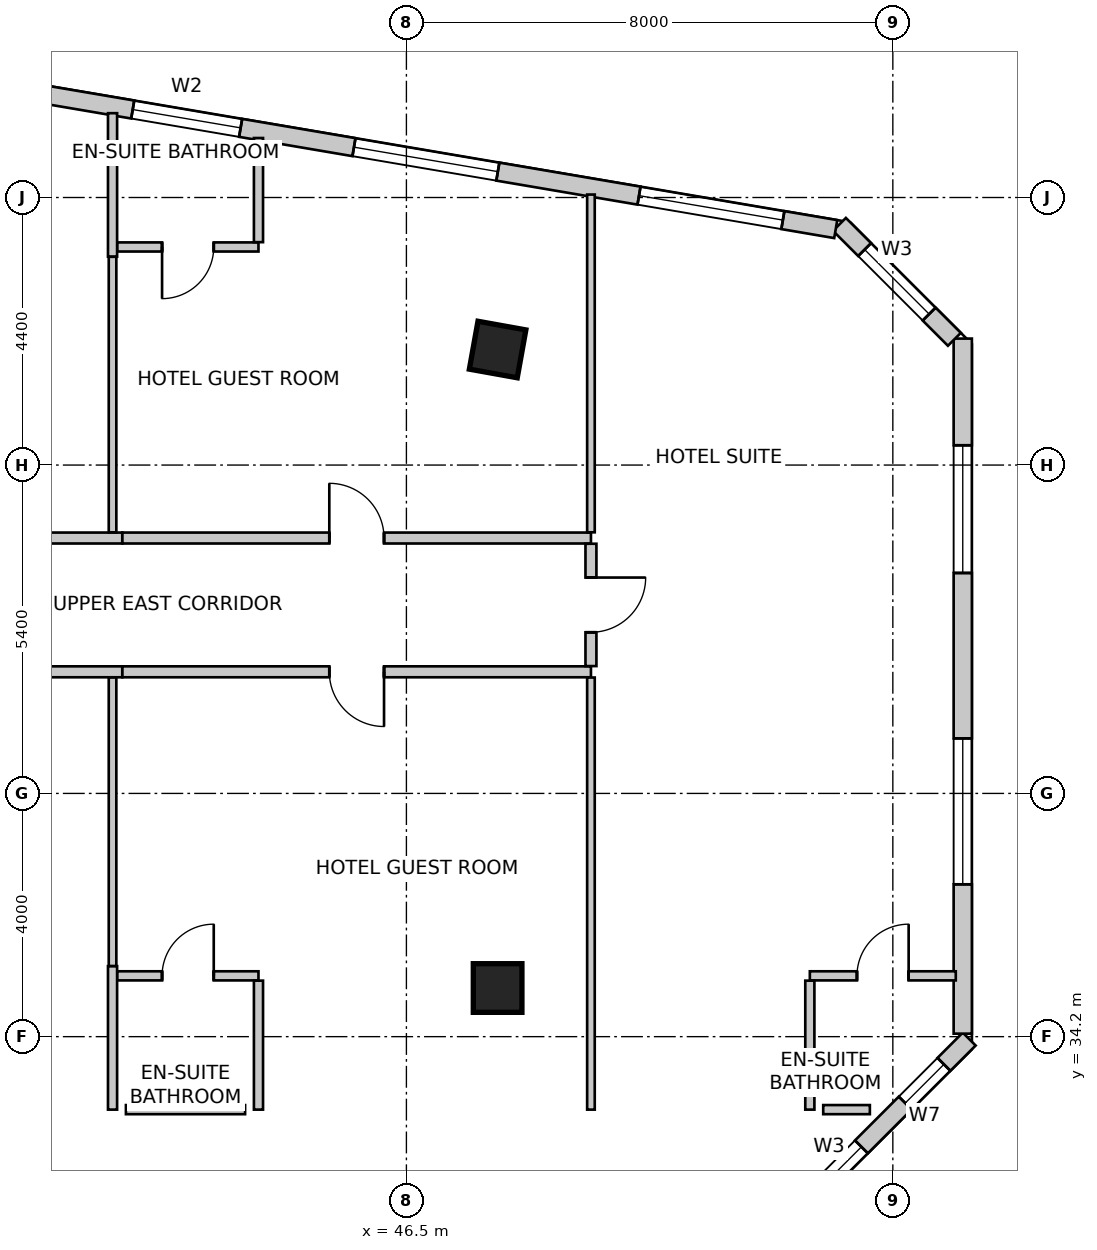
"""IFC4 building model, lengths in metres.
Left out: names, types, materials, properties, quantities, classifications, styles, units other than length and angle.
Written with IfcOpenShell. Run it as: python <this file> out.ifc"""

import sys

from ifc_helpers import new_model, si_unit, direction, frame, frame_2d, origin, origin_2d, place, context, subcontext, project, spatial, rectangle, extrude, source, transform, mapped, element, fill, save


model = new_model("IFC4")
c1 = context("Model", 3, precision=1e-05, world=origin(), true_north=direction((0.0, 1.0)))
c2 = subcontext(c1, "Body", "Model", "MODEL_VIEW")
j1 = project(units=[si_unit("LENGTHUNIT", "METRE"), si_unit("PLANEANGLEUNIT", "RADIAN")], contexts=[c1])
p1 = place(None, origin())
s1 = spatial("IfcSite", under=j1, at=p1, CompositionType="ELEMENT")
p2 = place(p1, origin())
s2 = spatial("IfcBuilding", under=s1, at=p2, CompositionType="ELEMENT")
p3 = place(p2, frame((0.0, 0.0, 161.0)))
s3 = spatial("IfcBuildingStorey", under=s2, at=p3, CompositionType="ELEMENT", Elevation=161.0)
m1 = source(origin(), c2, "Body", "SweptSolid", [
    extrude(rectangle(XDim=0.8, YDim=0.8, at=origin_2d()), origin(), (0.0, 0.0, 1.0), 3.6),
])
for number, where, z_axis, x_axis in (
    (1, (48.0, 45.5, 0.0), (0.0, 0.0, 1.0), (0.984, -0.177, 0.0)),
    (2, (48.0, 35.0, 0.0), (0.0, 0.0, 1.0), (1.0, 0.0, 0.0)),
):
    element("IfcColumn", number, at=place(p3, frame(where, z_axis=z_axis, x_axis=x_axis)), inside=s3, PredefinedType="COLUMN", context=c2, shape_type="MappedRepresentation", body=[
        mapped(m1, transform((0.0, 0.0, 0.0), scale=1.0)),
    ])
p4 = place(p3, frame((52.476, 30.88, 0.0), z_axis=(0.0, 0.0, 1.0), x_axis=(0.707106781187, 0.707106781187, 0.0)))
e3 = element("IfcWall", 3, at=p4, inside=s3, PredefinedType="SOLIDWALL", context=c2, shape_type="SweptSolid", body=[
    extrude(rectangle(XDim=4.639, YDim=0.3, at=frame_2d((2.319, 0.0))), origin(), (0.0, 0.0, 1.0), 3.35),
])
m2 = source(origin(), c2, "Body", "SweptSolid", [
    extrude(rectangle(XDim=1.5, YDim=1.8, at=frame_2d((0.75, 0.9))), frame((0.0, 0.16, 0.0), z_axis=(0.0, -1.0, 0.0), x_axis=(1.0, 0.0, 0.0)), (0.0, 0.0, 1.0), 0.32),
])
p5 = place(p4, frame((0.632, 0.0, 0.85)))
e4 = element("IfcOpeningElement", 4, at=p5, cuts=e3, PredefinedType="OPENING", context=c2, shape_type="MappedRepresentation", body=[
    mapped(m2, transform((0.0, 0.0, 0.0), scale=1.0)),
])
m3 = source(origin(), c2, "Body", "SweptSolid", [
    extrude(rectangle(XDim=0.9, YDim=1.6, at=frame_2d((0.45, 0.8))), frame((0.0, 0.16, 0.0), z_axis=(0.0, -1.0, 0.0), x_axis=(1.0, 0.0, 0.0)), (0.0, 0.0, 1.0), 0.32),
])
p6 = place(p4, frame((3.151, 0.0, 0.85)))
e5 = element("IfcOpeningElement", 5, at=p6, cuts=e3, PredefinedType="OPENING", context=c2, shape_type="MappedRepresentation", body=[
    mapped(m3, transform((0.0, 0.0, 0.0), scale=1.0)),
])
p7 = place(p3, frame((55.65, 34.249, 0.0), z_axis=(0.0, 0.0, 1.0), x_axis=(0.0, 1.0, 0.0)))
e6 = element("IfcWall", 6, at=p7, inside=s3, PredefinedType="SOLIDWALL", context=c2, shape_type="SweptSolid", body=[
    extrude(rectangle(XDim=11.431, YDim=0.3, at=frame_2d((5.715, 0.0))), origin(), (0.0, 0.0, 1.0), 3.35),
])
m4 = source(origin(), c2, "Body", "SweptSolid", [
    extrude(rectangle(XDim=2.4, YDim=2.2, at=frame_2d((1.2, 1.1))), frame((0.0, 0.16, 0.0), z_axis=(0.0, -1.0, 0.0), x_axis=(1.0, 0.0, 0.0)), (0.0, 0.0, 1.0), 0.32),
])
p8 = place(p7, frame((2.456, 0.0, 0.85)))
e7 = element("IfcOpeningElement", 7, at=p8, cuts=e6, PredefinedType="OPENING", context=c2, shape_type="MappedRepresentation", body=[
    mapped(m4, transform((0.0, 0.0, 0.0), scale=1.0)),
])
m5 = source(origin(), c2, "Body", "SweptSolid", [
    extrude(rectangle(XDim=2.1, YDim=2.0, at=frame_2d((1.05, 1.0))), frame((0.0, 0.16, 0.0), z_axis=(0.0, -1.0, 0.0), x_axis=(1.0, 0.0, 0.0)), (0.0, 0.0, 1.0), 0.32),
])
p9 = place(p7, frame((7.576, 0.0, 0.85)))
e8 = element("IfcOpeningElement", 8, at=p9, cuts=e6, PredefinedType="OPENING", context=c2, shape_type="MappedRepresentation", body=[
    mapped(m5, transform((0.0, 0.0, 0.0), scale=1.0)),
])
p10 = place(p3, frame((55.512, 45.668, 0.0), z_axis=(0.0, 0.0, 1.0), x_axis=(-0.707152443695, 0.707061115729, 0.0)))
e9 = element("IfcWall", 9, at=p10, inside=s3, PredefinedType="SOLIDWALL", context=c2, shape_type="SweptSolid", body=[
    extrude(rectangle(XDim=2.673, YDim=0.3, at=frame_2d((1.337, 0.0))), origin(), (0.0, 0.0, 1.0), 3.35),
])
p11 = place(p10, frame((0.587, 0.0, 0.85)))
e10 = element("IfcOpeningElement", 10, at=p11, cuts=e9, PredefinedType="OPENING", context=c2, shape_type="MappedRepresentation", body=[
    mapped(m2, transform((0.0, 0.0, 0.0), scale=1.0)),
])
p12 = place(p3, frame((53.561, 47.48, 0.0), z_axis=(0.0, 0.0, 1.0), x_axis=(-0.985845173895, 0.167658262868, 0.0)))
e11 = element("IfcWall", 11, at=p12, inside=s3, PredefinedType="SOLIDWALL", context=c2, shape_type="SweptSolid", body=[
    extrude(rectangle(XDim=32.132, YDim=0.3, at=frame_2d((16.066, 0.0))), origin(), (0.0, 0.0, 1.0), 3.35),
])
p13 = place(p12, frame((0.882, 0.0, 0.85)))
e12 = element("IfcOpeningElement", 12, at=p13, cuts=e11, PredefinedType="OPENING", context=c2, shape_type="MappedRepresentation", body=[
    mapped(m4, transform((0.0, 0.0, 0.0), scale=1.0)),
])
p14 = place(p12, frame((5.637, 0.0, 0.85)))
e13 = element("IfcOpeningElement", 13, at=p14, cuts=e11, PredefinedType="OPENING", context=c2, shape_type="MappedRepresentation", body=[
    mapped(m4, transform((0.0, 0.0, 0.0), scale=1.0)),
])
m6 = source(origin(), c2, "Body", "SweptSolid", [
    extrude(rectangle(XDim=1.8, YDim=2.1, at=frame_2d((0.9, 1.05))), frame((0.0, 0.16, 0.0), z_axis=(0.0, -1.0, 0.0), x_axis=(1.0, 0.0, 0.0)), (0.0, 0.0, 1.0), 0.32),
])
p15 = place(p12, frame((9.928, 0.0, 0.85)))
e14 = element("IfcOpeningElement", 14, at=p15, cuts=e11, PredefinedType="OPENING", context=c2, shape_type="MappedRepresentation", body=[
    mapped(m6, transform((0.0, 0.0, 0.0), scale=1.0)),
])
p16 = place(p12, frame((13.618, 0.0, 0.85)))
e15 = element("IfcOpeningElement", 15, at=p16, cuts=e11, PredefinedType="OPENING", context=c2, shape_type="MappedRepresentation", body=[
    mapped(m4, transform((0.0, 0.0, 0.0), scale=1.0)),
])
p17 = place(p12, frame((17.889, 0.0, 0.85)))
e16 = element("IfcOpeningElement", 16, at=p17, cuts=e11, PredefinedType="OPENING", context=c2, shape_type="MappedRepresentation", body=[
    mapped(m6, transform((0.0, 0.0, 0.0), scale=1.0)),
])
p18 = place(p12, frame((20.309, 0.0, 0.85)))
e17 = element("IfcOpeningElement", 17, at=p18, cuts=e11, PredefinedType="OPENING", context=c2, shape_type="MappedRepresentation", body=[
    mapped(m4, transform((0.0, 0.0, 0.0), scale=1.0)),
])
p19 = place(p12, frame((25.4, 0.0, 0.85)))
e18 = element("IfcOpeningElement", 18, at=p19, cuts=e11, PredefinedType="OPENING", context=c2, shape_type="MappedRepresentation", body=[
    mapped(m4, transform((0.0, 0.0, 0.0), scale=1.0)),
])
m7 = source(origin(), c2, "Body", "SweptSolid", [
    extrude(rectangle(XDim=1.2, YDim=1.6, at=frame_2d((0.6, 0.8))), frame((0.0, 0.16, 0.0), z_axis=(0.0, -1.0, 0.0), x_axis=(1.0, 0.0, 0.0)), (0.0, 0.0, 1.0), 0.32),
])
p20 = place(p12, frame((30.5, 0.0, 0.85)))
e19 = element("IfcOpeningElement", 19, at=p20, cuts=e11, PredefinedType="OPENING", context=c2, shape_type="MappedRepresentation", body=[
    mapped(m7, transform((0.0, 0.0, 0.0), scale=1.0)),
])
p21 = place(p3, frame((33.894, 42.4, 0.0), z_axis=(0.0, 0.0, 1.0), x_axis=(1.0, 0.0, 0.0)))
e20 = element("IfcWall", 20, at=p21, inside=s3, PredefinedType="PARTITIONING", context=c2, shape_type="SweptSolid", body=[
    extrude(rectangle(XDim=7.933, YDim=0.18, at=frame_2d((3.966, 0.0))), origin(), (0.0, 0.0, 1.0), 2.803),
])
m8 = source(origin(), c2, "Body", "SweptSolid", [
    extrude(rectangle(XDim=0.9, YDim=2.15, at=frame_2d((0.45, 1.075))), frame((0.0, 0.1, 0.0), z_axis=(0.0, -1.0, 0.0), x_axis=(1.0, 0.0, 0.0)), (0.0, 0.0, 1.0), 0.2),
])
p22 = place(p21, frame((2.723, 0.0, 0.0)))
e21 = element("IfcOpeningElement", 21, at=p22, cuts=e20, PredefinedType="OPENING", context=c2, shape_type="MappedRepresentation", body=[
    mapped(m8, transform((0.0, 0.0, 0.0), scale=1.0)),
])
p23 = place(p3, frame((41.827, 40.2, 0.0), z_axis=(0.0, 0.0, 1.0), x_axis=(-1.0, 0.0, 0.0)))
e22 = element("IfcWall", 22, at=p23, inside=s3, PredefinedType="PARTITIONING", context=c2, shape_type="SweptSolid", body=[
    extrude(rectangle(XDim=7.933, YDim=0.18, at=frame_2d((3.966, 0.0))), origin(), (0.0, 0.0, 1.0), 2.803),
])
p24 = place(p23, frame((4.799, 0.0, 0.0)))
e23 = element("IfcOpeningElement", 23, at=p24, cuts=e22, PredefinedType="OPENING", context=c2, shape_type="MappedRepresentation", body=[
    mapped(m8, transform((0.0, 0.0, 0.0), scale=1.0)),
])
p25 = place(p3, frame((41.829, 42.4, 0.0), z_axis=(0.0, 0.0, 1.0), x_axis=(1.0, 0.0, 0.0)))
e24 = element("IfcWall", 24, at=p25, inside=s3, PredefinedType="PARTITIONING", context=c2, shape_type="SweptSolid", body=[
    extrude(rectangle(XDim=7.706, YDim=0.18, at=frame_2d((3.853, 0.0))), origin(), (0.0, 0.0, 1.0), 2.803),
])
p26 = place(p25, frame((3.403, 0.0, 0.0)))
e25 = element("IfcOpeningElement", 25, at=p26, cuts=e24, PredefinedType="OPENING", context=c2, shape_type="MappedRepresentation", body=[
    mapped(m8, transform((0.0, 0.0, 0.0), scale=1.0)),
])
p27 = place(p3, frame((49.535, 40.2, 0.0), z_axis=(0.0, 0.0, 1.0), x_axis=(-1.0, 0.0, 0.0)))
e26 = element("IfcWall", 26, at=p27, inside=s3, PredefinedType="PARTITIONING", context=c2, shape_type="SweptSolid", body=[
    extrude(rectangle(XDim=7.706, YDim=0.18, at=frame_2d((3.853, 0.0))), origin(), (0.0, 0.0, 1.0), 2.803),
])
p28 = place(p27, frame((3.403, 0.0, 0.0)))
e27 = element("IfcOpeningElement", 27, at=p28, cuts=e26, PredefinedType="OPENING", context=c2, shape_type="MappedRepresentation", body=[
    mapped(m8, transform((0.0, 0.0, 0.0), scale=1.0)),
])
p29 = place(p3, frame((49.535, 42.306, 0.0), z_axis=(0.0, 0.0, 1.0), x_axis=(0.0, -1.0, 0.0)))
e28 = element("IfcWall", 28, at=p29, inside=s3, PredefinedType="PARTITIONING", context=c2, shape_type="SweptSolid", body=[
    extrude(rectangle(XDim=2.012, YDim=0.18, at=frame_2d((1.006, 0.0))), origin(), (0.0, 0.0, 1.0), 3.35),
])
p30 = place(p29, frame((0.556, 0.0, 0.0)))
e29 = element("IfcOpeningElement", 29, at=p30, cuts=e28, PredefinedType="OPENING", context=c2, shape_type="MappedRepresentation", body=[
    mapped(m8, transform((0.0, 0.0, 0.0), scale=1.0)),
])
p31 = place(p3, frame((41.667, 49.387, 0.0), z_axis=(0.0, 0.0, 1.0), x_axis=(0.0, -1.0, 0.0)))
e30 = element("IfcWall", 30, at=p31, inside=s3, PredefinedType="PARTITIONING", context=c2, shape_type="SweptSolid", body=[
    extrude(rectangle(XDim=2.36, YDim=0.15, at=frame_2d((1.18, 0.0))), origin(), (0.0, 0.0, 1.0), 3.35),
])
p32 = place(p3, frame((41.667, 47.025, 0.0), z_axis=(0.0, 0.0, 1.0), x_axis=(0.0, -1.0, 0.0)))
e31 = element("IfcWall", 31, at=p32, inside=s3, PredefinedType="PARTITIONING", context=c2, shape_type="SweptSolid", body=[
    extrude(rectangle(XDim=4.531, YDim=0.125, at=frame_2d((2.265, 0.0))), origin(), (0.0, 0.0, 1.0), 2.492),
])
p33 = place(p3, frame((41.667, 35.36, 0.0), z_axis=(0.0, 0.0, 1.0), x_axis=(0.0, -1.0, 0.0)))
e32 = element("IfcWall", 32, at=p33, inside=s3, PredefinedType="PARTITIONING", context=c2, shape_type="SweptSolid", body=[
    extrude(rectangle(XDim=2.36, YDim=0.15, at=frame_2d((1.18, 0.0))), origin(), (0.0, 0.0, 1.0), 2.492),
])
p34 = place(p3, frame((41.667, 40.106, 0.0), z_axis=(0.0, 0.0, 1.0), x_axis=(0.0, -1.0, 0.0)))
e33 = element("IfcWall", 33, at=p34, inside=s3, PredefinedType="PARTITIONING", context=c2, shape_type="SweptSolid", body=[
    extrude(rectangle(XDim=4.744, YDim=0.125, at=frame_2d((2.372, 0.0))), origin(), (0.0, 0.0, 1.0), 2.879),
])
p35 = place(p3, frame((44.067, 47.187, 0.0), z_axis=(0.0, 0.0, 1.0), x_axis=(-1.0, 0.0, 0.0)))
e34 = element("IfcWall", 34, at=p35, inside=s3, PredefinedType="PARTITIONING", context=c2, shape_type="SweptSolid", body=[
    extrude(rectangle(XDim=2.321, YDim=0.15, at=frame_2d((1.16, 0.0))), origin(), (0.0, 0.0, 1.0), 3.35),
])
m9 = source(origin(), c2, "Body", "SweptSolid", [
    extrude(rectangle(XDim=0.85, YDim=2.15, at=frame_2d((0.425, 1.075))), frame((0.0, 0.085, 0.0), z_axis=(0.0, -1.0, 0.0), x_axis=(1.0, 0.0, 0.0)), (0.0, 0.0, 1.0), 0.17),
])
p36 = place(p35, frame((0.736, 0.0, 0.0)))
e35 = element("IfcOpeningElement", 35, at=p36, cuts=e34, PredefinedType="OPENING", context=c2, shape_type="MappedRepresentation", body=[
    mapped(m9, transform((0.0, 0.0, 0.0), scale=1.0)),
])
p37 = place(p3, frame((44.067, 48.979, 0.0), z_axis=(0.0, 0.0, 1.0), x_axis=(0.0, -1.0, 0.0)))
e36 = element("IfcWall", 36, at=p37, inside=s3, PredefinedType="PARTITIONING", context=c2, shape_type="SweptSolid", body=[
    extrude(rectangle(XDim=1.713, YDim=0.15, at=frame_2d((0.856, 0.0))), origin(), (0.0, 0.0, 1.0), 3.35),
])
p38 = place(p3, frame((49.535, 48.049, 0.0), z_axis=(0.0, 0.0, 1.0), x_axis=(0.0, -1.0, 0.0)))
e37 = element("IfcWall", 37, at=p38, inside=s3, PredefinedType="PARTITIONING", context=c2, shape_type="SweptSolid", body=[
    extrude(rectangle(XDim=5.555, YDim=0.125, at=frame_2d((2.777, 0.0))), origin(), (0.0, 0.0, 1.0), 3.35),
])
p39 = place(p3, frame((41.746, 35.2, 0.0), z_axis=(0.0, 0.0, 1.0), x_axis=(1.0, 0.0, 0.0)))
e38 = element("IfcWall", 38, at=p39, inside=s3, PredefinedType="PARTITIONING", context=c2, shape_type="SweptSolid", body=[
    extrude(rectangle(XDim=2.321, YDim=0.15, at=frame_2d((1.16, 0.0))), origin(), (0.0, 0.0, 1.0), 2.492),
])
p40 = place(p39, frame((0.736, 0.0, 0.0)))
e39 = element("IfcOpeningElement", 39, at=p40, cuts=e38, PredefinedType="OPENING", context=c2, shape_type="MappedRepresentation", body=[
    mapped(m9, transform((0.0, 0.0, 0.0), scale=1.0)),
])
p41 = place(p3, frame((44.067, 35.121, 0.0), z_axis=(0.0, 0.0, 1.0), x_axis=(0.0, -1.0, 0.0)))
e40 = element("IfcWall", 40, at=p41, inside=s3, PredefinedType="PARTITIONING", context=c2, shape_type="SweptSolid", body=[
    extrude(rectangle(XDim=2.121, YDim=0.15, at=frame_2d((1.061, 0.0))), origin(), (0.0, 0.0, 1.0), 2.492),
])
p42 = place(p3, frame((49.535, 40.106, 0.0), z_axis=(0.0, 0.0, 1.0), x_axis=(0.0, -1.0, 0.0)))
e41 = element("IfcWall", 41, at=p42, inside=s3, PredefinedType="PARTITIONING", context=c2, shape_type="SweptSolid", body=[
    extrude(rectangle(XDim=7.106, YDim=0.125, at=frame_2d((3.553, 0.0))), origin(), (0.0, 0.0, 1.0), 3.35),
])
p43 = place(p3, frame((53.135, 35.2, 0.0), z_axis=(0.0, 0.0, 1.0), x_axis=(1.0, 0.0, 0.0)))
e42 = element("IfcWall", 42, at=p43, inside=s3, PredefinedType="PARTITIONING", context=c2, shape_type="SweptSolid", body=[
    extrude(rectangle(XDim=2.4, YDim=0.15, at=frame_2d((1.2, 0.0))), origin(), (0.0, 0.0, 1.0), 3.35),
])
p44 = place(p43, frame((0.775, 0.0, 0.0)))
e43 = element("IfcOpeningElement", 43, at=p44, cuts=e42, PredefinedType="OPENING", context=c2, shape_type="MappedRepresentation", body=[
    mapped(m9, transform((0.0, 0.0, 0.0), scale=1.0)),
])
p45 = place(p3, frame((53.135, 33.0, 0.0), z_axis=(0.0, 0.0, 1.0), x_axis=(0.0, 1.0, 0.0)))
e44 = element("IfcWall", 44, at=p45, inside=s3, PredefinedType="PARTITIONING", context=c2, shape_type="SweptSolid", body=[
    extrude(rectangle(XDim=2.121, YDim=0.15, at=frame_2d((1.061, 0.0))), origin(), (0.0, 0.0, 1.0), 3.35),
])
p46 = place(p3, frame((43.847, 33.0, 0.0), z_axis=(0.0, 0.0, 1.0), x_axis=(-1.0, 0.0, 0.0)))
e45 = element("IfcWall", 45, at=p46, inside=s3, PredefinedType="PARTITIONING", context=c2, shape_type="SweptSolid", body=[
    extrude(rectangle(XDim=1.96, YDim=0.15, at=frame_2d((0.98, 0.0))), origin(), (0.0, 0.0, 1.0), 3.35),
])
p47 = place(p3, frame((54.122, 33.0, 0.0), z_axis=(0.0, 0.0, 1.0), x_axis=(-1.0, 0.0, 0.0)))
e46 = element("IfcWall", 46, at=p47, inside=s3, PredefinedType="PARTITIONING", context=c2, shape_type="SweptSolid", body=[
    extrude(rectangle(XDim=0.767, YDim=0.15, at=frame_2d((0.384, 0.0))), origin(), (0.0, 0.0, 1.0), 3.35),
])
m10 = source(origin(), c2, "Body", "SweptSolid", [
    extrude(rectangle(XDim=1.5, YDim=1.8, at=frame_2d((0.75, 0.9))), frame((0.0, -0.015, 0.0), z_axis=(0.0, -1.0, 0.0), x_axis=(1.0, 0.0, 0.0)), (0.0, 0.0, 1.0), 0.06),
])
p48 = place(p5, origin())
e47 = element("IfcWindow", 47, at=p48, inside=s3, PartitioningType="SINGLE_PANEL", PredefinedType="WINDOW", context=c2, shape_type="MappedRepresentation", body=[
    mapped(m10, transform((0.0, 0.0, 0.0), scale=1.0)),
])
fill(e4, e47)
m11 = source(origin(), c2, "Body", "SweptSolid", [
    extrude(rectangle(XDim=0.9, YDim=1.6, at=frame_2d((0.45, 0.8))), frame((0.0, -0.015, 0.0), z_axis=(0.0, -1.0, 0.0), x_axis=(1.0, 0.0, 0.0)), (0.0, 0.0, 1.0), 0.06),
])
p49 = place(p6, origin())
e48 = element("IfcWindow", 48, at=p49, inside=s3, PartitioningType="SINGLE_PANEL", PredefinedType="WINDOW", context=c2, shape_type="MappedRepresentation", body=[
    mapped(m11, transform((0.0, 0.0, 0.0), scale=1.0)),
])
fill(e5, e48)
m12 = source(origin(), c2, "Body", "SweptSolid", [
    extrude(rectangle(XDim=2.4, YDim=2.2, at=frame_2d((1.2, 1.1))), frame((0.0, -0.015, 0.0), z_axis=(0.0, -1.0, 0.0), x_axis=(1.0, 0.0, 0.0)), (0.0, 0.0, 1.0), 0.06),
])
p50 = place(p8, origin())
e49 = element("IfcWindow", 49, at=p50, inside=s3, PartitioningType="SINGLE_PANEL", PredefinedType="WINDOW", context=c2, shape_type="MappedRepresentation", body=[
    mapped(m12, transform((0.0, 0.0, 0.0), scale=1.0)),
])
fill(e7, e49)
m13 = source(origin(), c2, "Body", "SweptSolid", [
    extrude(rectangle(XDim=2.1, YDim=2.0, at=frame_2d((1.05, 1.0))), frame((0.0, -0.015, 0.0), z_axis=(0.0, -1.0, 0.0), x_axis=(1.0, 0.0, 0.0)), (0.0, 0.0, 1.0), 0.06),
])
p51 = place(p9, origin())
e50 = element("IfcWindow", 50, at=p51, inside=s3, PartitioningType="SINGLE_PANEL", PredefinedType="WINDOW", context=c2, shape_type="MappedRepresentation", body=[
    mapped(m13, transform((0.0, 0.0, 0.0), scale=1.0)),
])
fill(e8, e50)
p52 = place(p11, origin())
e51 = element("IfcWindow", 51, at=p52, inside=s3, PartitioningType="SINGLE_PANEL", PredefinedType="WINDOW", context=c2, shape_type="MappedRepresentation", body=[
    mapped(m10, transform((0.0, 0.0, 0.0), scale=1.0)),
])
fill(e10, e51)
p53 = place(p13, origin())
e52 = element("IfcWindow", 52, at=p53, inside=s3, PartitioningType="SINGLE_PANEL", PredefinedType="WINDOW", context=c2, shape_type="MappedRepresentation", body=[
    mapped(m12, transform((0.0, 0.0, 0.0), scale=1.0)),
])
fill(e12, e52)
p54 = place(p14, origin())
e53 = element("IfcWindow", 53, at=p54, inside=s3, PartitioningType="SINGLE_PANEL", PredefinedType="WINDOW", context=c2, shape_type="MappedRepresentation", body=[
    mapped(m12, transform((0.0, 0.0, 0.0), scale=1.0)),
])
fill(e13, e53)
m14 = source(origin(), c2, "Body", "SweptSolid", [
    extrude(rectangle(XDim=1.8, YDim=2.1, at=frame_2d((0.9, 1.05))), frame((0.0, -0.015, 0.0), z_axis=(0.0, -1.0, 0.0), x_axis=(1.0, 0.0, 0.0)), (0.0, 0.0, 1.0), 0.06),
])
p55 = place(p15, origin())
e54 = element("IfcWindow", 54, at=p55, inside=s3, PartitioningType="SINGLE_PANEL", PredefinedType="WINDOW", context=c2, shape_type="MappedRepresentation", body=[
    mapped(m14, transform((0.0, 0.0, 0.0), scale=1.0)),
])
fill(e14, e54)
m15 = source(origin(), c2, "Body", "SweptSolid", [
    extrude(rectangle(XDim=0.85, YDim=2.15, at=frame_2d((0.425, 1.075))), frame((0.0, 0.025, 0.0), z_axis=(0.0, -1.0, 0.0), x_axis=(1.0, 0.0, 0.0)), (0.0, 0.0, 1.0), 0.05),
])
p56 = place(p36, origin())
e55 = element("IfcDoor", 55, at=p56, inside=s3, OperationType="SINGLE_SWING_RIGHT", PredefinedType="DOOR", context=c2, shape_type="MappedRepresentation", body=[
    mapped(m15, transform((0.0, 0.0, 0.0), scale=1.0)),
])
fill(e35, e55)
m16 = source(origin(), c2, "Body", "SweptSolid", [
    extrude(rectangle(XDim=0.9, YDim=2.15, at=frame_2d((0.45, 1.075))), frame((0.0, 0.025, 0.0), z_axis=(0.0, -1.0, 0.0), x_axis=(1.0, 0.0, 0.0)), (0.0, 0.0, 1.0), 0.05),
])
p57 = place(p26, origin())
e56 = element("IfcDoor", 56, at=p57, inside=s3, OperationType="SINGLE_SWING_LEFT", PredefinedType="DOOR", context=c2, shape_type="MappedRepresentation", body=[
    mapped(m16, transform((0.0, 0.0, 0.0), scale=1.0)),
])
fill(e25, e56)
p58 = place(p40, origin())
e57 = element("IfcDoor", 57, at=p58, inside=s3, OperationType="SINGLE_SWING_RIGHT", PredefinedType="DOOR", context=c2, shape_type="MappedRepresentation", body=[
    mapped(m15, transform((0.0, 0.0, 0.0), scale=1.0)),
])
fill(e39, e57)
p59 = place(p28, origin())
e58 = element("IfcDoor", 58, at=p59, inside=s3, OperationType="SINGLE_SWING_LEFT", PredefinedType="DOOR", context=c2, shape_type="MappedRepresentation", body=[
    mapped(m16, transform((0.0, 0.0, 0.0), scale=1.0)),
])
fill(e27, e58)
p60 = place(p44, origin())
e59 = element("IfcDoor", 59, at=p60, inside=s3, OperationType="SINGLE_SWING_RIGHT", PredefinedType="DOOR", context=c2, shape_type="MappedRepresentation", body=[
    mapped(m15, transform((0.0, 0.0, 0.0), scale=1.0)),
])
fill(e43, e59)
p61 = place(p30, origin())
e60 = element("IfcDoor", 60, at=p61, inside=s3, OperationType="SINGLE_SWING_LEFT", PredefinedType="DOOR", context=c2, shape_type="MappedRepresentation", body=[
    mapped(m16, transform((0.0, 0.0, 0.0), scale=1.0)),
])
fill(e29, e60)
save(model, sys.argv[1])
